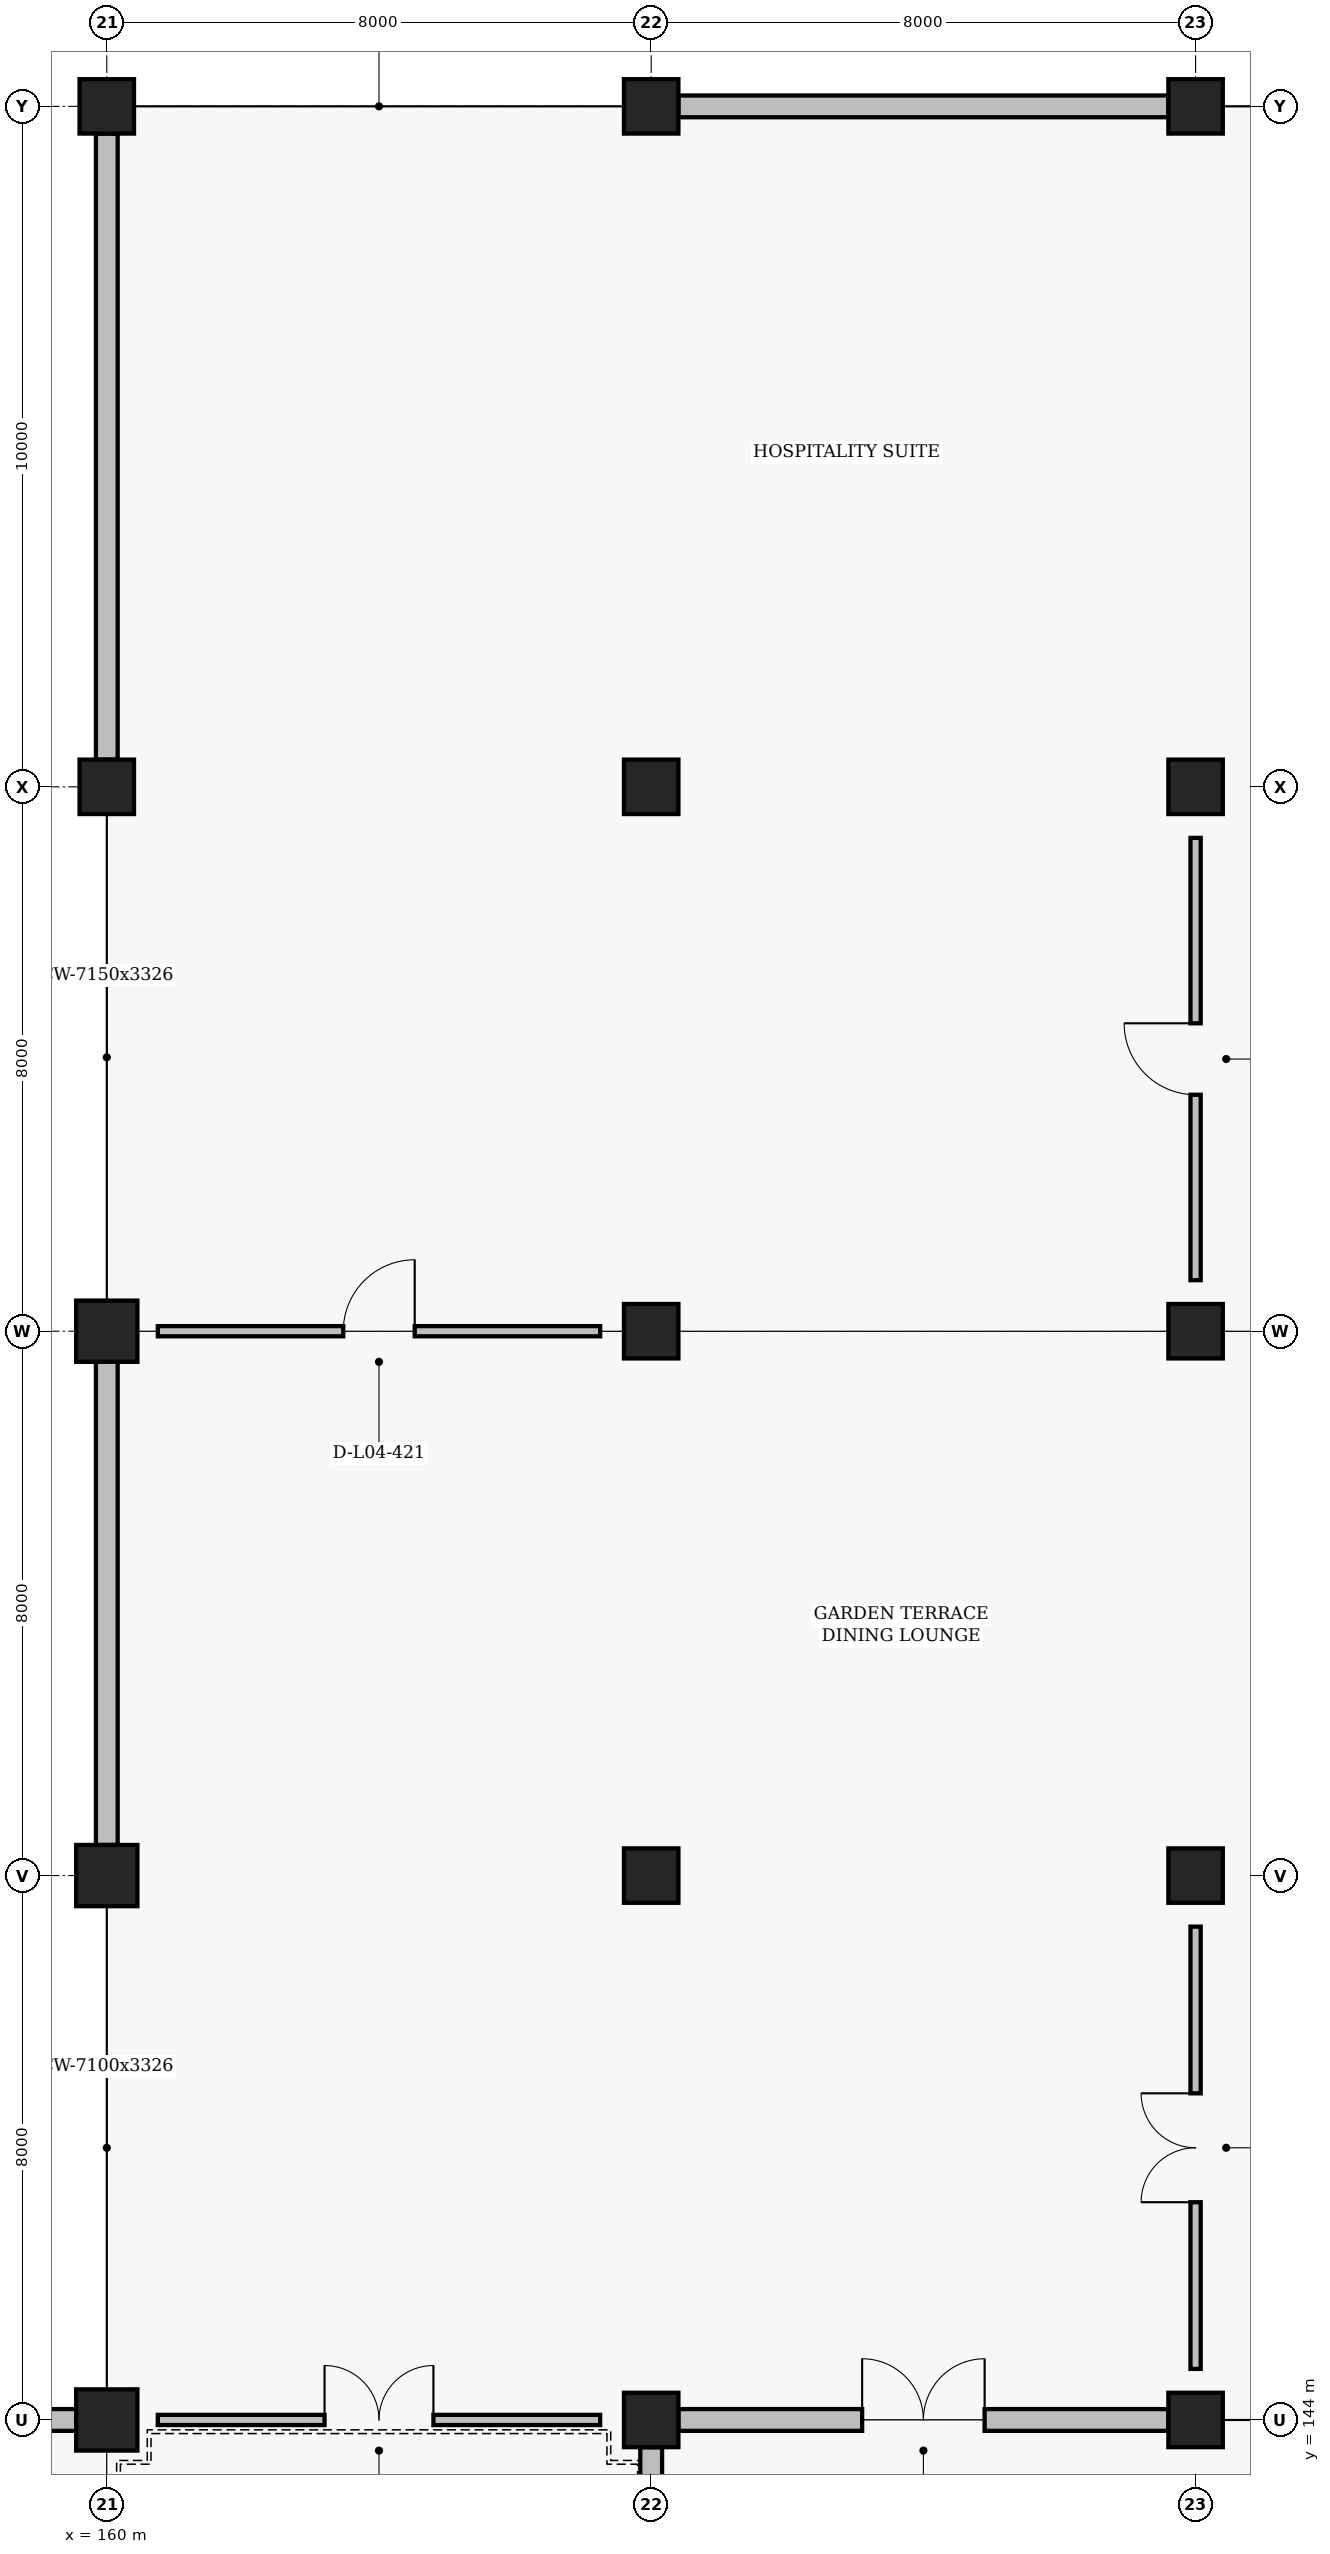
"""IFC4 building model, lengths in metres.
Left out: names, types, materials, properties, quantities, classifications, styles, units other than length and angle.
Written with IfcOpenShell. Run it as: python <this file> out.ifc"""

import sys

from ifc_helpers import new_model, si_unit, direction, frame, frame_2d, origin, origin_2d, place, context, subcontext, project, spatial, rectangle, extrude, element, fill, save


model = new_model("IFC4")
c1 = context("Model", 3, precision=1e-05, world=origin(), true_north=direction((0.0, 1.0)))
c2 = subcontext(c1, "Body", "Model", "MODEL_VIEW")
j1 = project(units=[si_unit("LENGTHUNIT", "METRE"), si_unit("PLANEANGLEUNIT", "RADIAN")], contexts=[c1])
p1 = place(None, origin())
s1 = spatial("IfcSite", under=j1, at=p1, CompositionType="ELEMENT")
p2 = place(p1, origin())
s2 = spatial("IfcBuilding", under=s1, at=p2, CompositionType="ELEMENT")
p3 = place(p2, frame((0.0, 0.0, 14.4)))
s3 = spatial("IfcBuildingStorey", under=s2, at=p3, CompositionType="ELEMENT", Elevation=14.4)
for number, where, z_axis, x_axis in (
    (1, (160.0, 144.0, 0.0), (0.0, 0.0, 1.0), (1.0, 0.0, 0.0)),
    (2, (160.0, 152.0, 0.0), (0.0, 0.0, 1.0), (1.0, 0.0, 0.0)),
    (3, (160.0, 160.0, 0.0), (0.0, 0.0, 1.0), (1.0, 0.0, 0.0)),
):
    element("IfcColumn", number, at=place(p3, frame(where, z_axis=z_axis, x_axis=x_axis)), inside=s3, PredefinedType="COLUMN", context=c2, shape_type="SweptSolid", body=[
        extrude(rectangle(XDim=0.9, YDim=0.9, at=origin_2d()), origin(), (0.0, 0.0, 1.0), 4.2),
    ])
for number, where, z_axis, x_axis in (
    (4, (160.0, 168.0, 0.0), (0.0, 0.0, 1.0), (1.0, 0.0, 0.0)),
    (5, (160.0, 178.0, 0.0), (0.0, 0.0, 1.0), (1.0, 0.0, 0.0)),
    (6, (168.0, 144.0, 0.0), (0.0, 0.0, 1.0), (1.0, 0.0, 0.0)),
    (7, (168.0, 152.0, 0.0), (0.0, 0.0, 1.0), (1.0, 0.0, 0.0)),
    (8, (168.0, 160.0, 0.0), (0.0, 0.0, 1.0), (1.0, 0.0, 0.0)),
    (9, (168.0, 168.0, 0.0), (0.0, 0.0, 1.0), (1.0, 0.0, 0.0)),
    (10, (168.0, 178.0, 0.0), (0.0, 0.0, 1.0), (1.0, 0.0, 0.0)),
    (11, (176.0, 144.0, 0.0), (0.0, 0.0, 1.0), (1.0, 0.0, 0.0)),
    (12, (176.0, 152.0, 0.0), (0.0, 0.0, 1.0), (1.0, 0.0, 0.0)),
    (13, (176.0, 160.0, 0.0), (0.0, 0.0, 1.0), (1.0, 0.0, 0.0)),
    (14, (176.0, 168.0, 0.0), (0.0, 0.0, 1.0), (1.0, 0.0, 0.0)),
    (15, (176.0, 178.0, 0.0), (0.0, 0.0, 1.0), (1.0, 0.0, 0.0)),
):
    element("IfcColumn", number, at=place(p3, frame(where, z_axis=z_axis, x_axis=x_axis)), inside=s3, PredefinedType="COLUMN", context=c2, shape_type="SweptSolid", body=[
        extrude(rectangle(XDim=0.8, YDim=0.8, at=origin_2d()), origin(), (0.0, 0.0, 1.0), 4.2),
    ])
p4 = place(p3, frame((152.45, 144.0, 0.0), z_axis=(0.0, 0.0, 1.0), x_axis=(1.0, 0.0, 0.0)))
e16 = element("IfcWall", 16, at=p4, inside=s3, PredefinedType="SOLIDWALL", context=c2, shape_type="SweptSolid", body=[
    extrude(rectangle(XDim=7.1, YDim=0.32, at=frame_2d((3.55, 0.0))), origin(), (0.0, 0.0, 1.0), 3.326),
])
p5 = place(p3, frame((168.0, 136.4, 0.0), z_axis=(0.0, 0.0, 1.0), x_axis=(0.0, 1.0, 0.0)))
e17 = element("IfcWall", 17, at=p5, inside=s3, PredefinedType="SOLIDWALL", context=c2, shape_type="SweptSolid", body=[
    extrude(rectangle(XDim=7.2, YDim=0.32, at=frame_2d((3.6, 0.0))), origin(), (0.0, 0.0, 1.0), 3.35),
])
p6 = place(p5, frame((2.6, 0.0, 0.0)))
e18 = element("IfcOpeningElement", 18, at=p6, cuts=e17, PredefinedType="OPENING", context=c2, shape_type="SweptSolid", body=[
    extrude(rectangle(XDim=2.0, YDim=2.4, at=frame_2d((1.0, 1.2))), frame((0.0, 0.17, 0.0), z_axis=(0.0, -1.0, 0.0), x_axis=(1.0, 0.0, 0.0)), (0.0, 0.0, 1.0), 0.34),
])
p7 = place(p3, frame((160.0, 152.45, 0.0), z_axis=(0.0, 0.0, 1.0), x_axis=(0.0, 1.0, 0.0)))
e19 = element("IfcWall", 19, at=p7, inside=s3, PredefinedType="SOLIDWALL", context=c2, shape_type="SweptSolid", body=[
    extrude(rectangle(XDim=7.1, YDim=0.32, at=frame_2d((3.55, 0.0))), origin(), (0.0, 0.0, 1.0), 3.326),
])
p8 = place(p3, frame((160.0, 168.4, 0.0), z_axis=(0.0, 0.0, 1.0), x_axis=(0.0, 1.0, 0.0)))
e20 = element("IfcWall", 20, at=p8, inside=s3, PredefinedType="SOLIDWALL", context=c2, shape_type="SweptSolid", body=[
    extrude(rectangle(XDim=9.2, YDim=0.32, at=frame_2d((4.6, 0.0))), origin(), (0.0, 0.0, 1.0), 3.35),
])
p9 = place(p3, frame((168.4, 144.0, 0.0), z_axis=(0.0, 0.0, 1.0), x_axis=(1.0, 0.0, 0.0)))
e21 = element("IfcWall", 21, at=p9, inside=s3, PredefinedType="SOLIDWALL", context=c2, shape_type="SweptSolid", body=[
    extrude(rectangle(XDim=7.2, YDim=0.32, at=frame_2d((3.6, 0.0))), origin(), (0.0, 0.0, 1.0), 3.35),
])
p10 = place(p9, frame((2.7, 0.0, 0.0)))
e22 = element("IfcOpeningElement", 22, at=p10, cuts=e21, PredefinedType="OPENING", context=c2, shape_type="SweptSolid", body=[
    extrude(rectangle(XDim=1.8, YDim=2.3, at=frame_2d((0.9, 1.15))), frame((0.0, 0.17, 0.0), z_axis=(0.0, -1.0, 0.0), x_axis=(1.0, 0.0, 0.0)), (0.0, 0.0, 1.0), 0.34),
])
p11 = place(p3, frame((168.4, 178.0, 0.0), z_axis=(0.0, 0.0, 1.0), x_axis=(1.0, 0.0, 0.0)))
e23 = element("IfcWall", 23, at=p11, inside=s3, PredefinedType="SOLIDWALL", context=c2, shape_type="SweptSolid", body=[
    extrude(rectangle(XDim=7.2, YDim=0.32, at=frame_2d((3.6, 0.0))), origin(), (0.0, 0.0, 1.0), 3.17),
])
p12 = place(p3, frame((160.75, 144.0, 0.0), z_axis=(0.0, 0.0, 1.0), x_axis=(1.0, 0.0, 0.0)))
e24 = element("IfcWall", 24, at=p12, inside=s3, PredefinedType="PARTITIONING", context=c2, shape_type="SweptSolid", body=[
    extrude(rectangle(XDim=6.5, YDim=0.15, at=frame_2d((3.25, 0.0))), origin(), (0.0, 0.0, 1.0), 3.47),
])
p13 = place(p12, frame((2.45, 0.0, 0.0)))
e25 = element("IfcOpeningElement", 25, at=p13, cuts=e24, PredefinedType="OPENING", context=c2, shape_type="SweptSolid", body=[
    extrude(rectangle(XDim=1.6, YDim=2.2, at=frame_2d((0.8, 1.1))), frame((0.0, 0.085, 0.0), z_axis=(0.0, -1.0, 0.0), x_axis=(1.0, 0.0, 0.0)), (0.0, 0.0, 1.0), 0.17),
])
p14 = place(p3, frame((160.75, 160.0, 0.0), z_axis=(0.0, 0.0, 1.0), x_axis=(1.0, 0.0, 0.0)))
e26 = element("IfcWall", 26, at=p14, inside=s3, PredefinedType="PARTITIONING", context=c2, shape_type="SweptSolid", body=[
    extrude(rectangle(XDim=6.5, YDim=0.15, at=frame_2d((3.25, 0.0))), origin(), (0.0, 0.0, 1.0), 3.47),
])
p15 = place(p14, frame((2.725, 0.0, 0.0)))
e27 = element("IfcOpeningElement", 27, at=p15, cuts=e26, PredefinedType="OPENING", context=c2, shape_type="SweptSolid", body=[
    extrude(rectangle(XDim=1.05, YDim=2.15, at=frame_2d((0.525, 1.075))), frame((0.0, 0.085, 0.0), z_axis=(0.0, -1.0, 0.0), x_axis=(1.0, 0.0, 0.0)), (0.0, 0.0, 1.0), 0.17),
])
p16 = place(p3, frame((176.0, 144.75, 0.0), z_axis=(0.0, 0.0, 1.0), x_axis=(0.0, 1.0, 0.0)))
e28 = element("IfcWall", 28, at=p16, inside=s3, PredefinedType="PARTITIONING", context=c2, shape_type="SweptSolid", body=[
    extrude(rectangle(XDim=6.5, YDim=0.15, at=frame_2d((3.25, 0.0))), origin(), (0.0, 0.0, 1.0), 3.37),
])
p17 = place(p16, frame((2.45, 0.0, 0.0)))
e29 = element("IfcOpeningElement", 29, at=p17, cuts=e28, PredefinedType="OPENING", context=c2, shape_type="SweptSolid", body=[
    extrude(rectangle(XDim=1.6, YDim=2.2, at=frame_2d((0.8, 1.1))), frame((0.0, 0.085, 0.0), z_axis=(0.0, -1.0, 0.0), x_axis=(1.0, 0.0, 0.0)), (0.0, 0.0, 1.0), 0.17),
])
p18 = place(p3, frame((176.0, 160.75, 0.0), z_axis=(0.0, 0.0, 1.0), x_axis=(0.0, 1.0, 0.0)))
e30 = element("IfcWall", 30, at=p18, inside=s3, PredefinedType="PARTITIONING", context=c2, shape_type="SweptSolid", body=[
    extrude(rectangle(XDim=6.5, YDim=0.15, at=frame_2d((3.25, 0.0))), origin(), (0.0, 0.0, 1.0), 3.37),
])
p19 = place(p18, frame((2.725, 0.0, 0.0)))
e31 = element("IfcOpeningElement", 31, at=p19, cuts=e30, PredefinedType="OPENING", context=c2, shape_type="SweptSolid", body=[
    extrude(rectangle(XDim=1.05, YDim=2.15, at=frame_2d((0.525, 1.075))), frame((0.0, 0.085, 0.0), z_axis=(0.0, -1.0, 0.0), x_axis=(1.0, 0.0, 0.0)), (0.0, 0.0, 1.0), 0.17),
])
p20 = place(p10, origin())
e32 = element("IfcDoor", 32, at=p20, inside=s3, OperationType="DOUBLE_SWING_LEFT", PredefinedType="DOOR", context=c2, shape_type="SweptSolid", body=[
    extrude(rectangle(XDim=1.8, YDim=2.3, at=frame_2d((0.9, 1.15))), frame((0.0, 0.025, 0.0), z_axis=(0.0, -1.0, 0.0), x_axis=(1.0, 0.0, 0.0)), (0.0, 0.0, 1.0), 0.05),
])
fill(e22, e32)
p21 = place(p13, origin())
e33 = element("IfcDoor", 33, at=p21, inside=s3, OperationType="DOUBLE_SWING_LEFT", PredefinedType="DOOR", context=c2, shape_type="SweptSolid", body=[
    extrude(rectangle(XDim=1.6, YDim=2.2, at=frame_2d((0.8, 1.1))), frame((0.0, 0.025, 0.0), z_axis=(0.0, -1.0, 0.0), x_axis=(1.0, 0.0, 0.0)), (0.0, 0.0, 1.0), 0.05),
])
fill(e25, e33)
p22 = place(p15, origin())
e34 = element("IfcDoor", 34, at=p22, inside=s3, OperationType="SINGLE_SWING_RIGHT", PredefinedType="DOOR", context=c2, shape_type="SweptSolid", body=[
    extrude(rectangle(XDim=1.05, YDim=2.15, at=frame_2d((0.525, 1.075))), frame((0.0, 0.025, 0.0), z_axis=(0.0, -1.0, 0.0), x_axis=(1.0, 0.0, 0.0)), (0.0, 0.0, 1.0), 0.05),
])
fill(e27, e34)
p23 = place(p17, origin())
e35 = element("IfcDoor", 35, at=p23, inside=s3, OperationType="DOUBLE_SWING_LEFT", PredefinedType="DOOR", context=c2, shape_type="SweptSolid", body=[
    extrude(rectangle(XDim=1.6, YDim=2.2, at=frame_2d((0.8, 1.1))), frame((0.0, 0.025, 0.0), z_axis=(0.0, -1.0, 0.0), x_axis=(1.0, 0.0, 0.0)), (0.0, 0.0, 1.0), 0.05),
])
fill(e29, e35)
p24 = place(p19, origin())
e36 = element("IfcDoor", 36, at=p24, inside=s3, OperationType="SINGLE_SWING_RIGHT", PredefinedType="DOOR", context=c2, shape_type="SweptSolid", body=[
    extrude(rectangle(XDim=1.05, YDim=2.15, at=frame_2d((0.525, 1.075))), frame((0.0, 0.025, 0.0), z_axis=(0.0, -1.0, 0.0), x_axis=(1.0, 0.0, 0.0)), (0.0, 0.0, 1.0), 0.05),
])
fill(e31, e36)
save(model, sys.argv[1])
